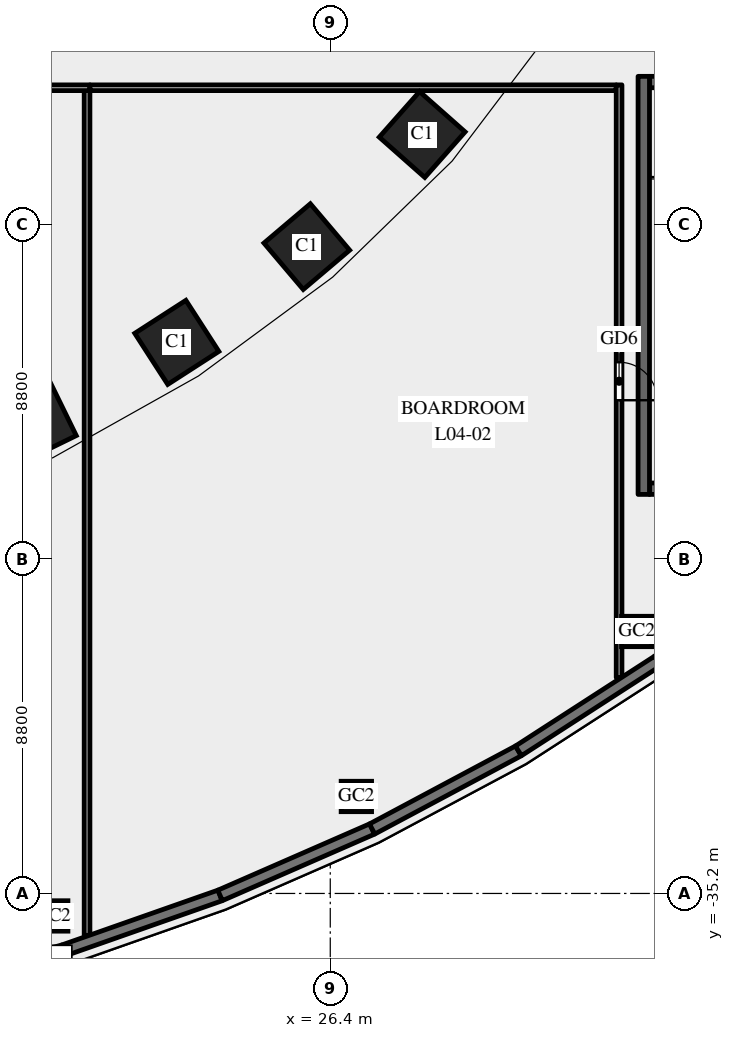
"""IFC4 building model, lengths in metres.
Left out: names, types, materials, properties, quantities, classifications, styles, units other than length and angle.
Written with IfcOpenShell. Run it as: python <this file> out.ifc"""

import sys

from ifc_helpers import new_model, si_unit, direction, frame, frame_2d, origin, origin_2d, place, context, subcontext, project, spatial, rectangle, hollow_rectangle, extrude, element, fill, save


model = new_model("IFC4")
c1 = context("Model", 3, precision=1e-05, world=origin(), true_north=direction((0.0, 1.0)))
c2 = subcontext(c1, "Body", "Model", "MODEL_VIEW")
j1 = project(units=[si_unit("LENGTHUNIT", "METRE"), si_unit("PLANEANGLEUNIT", "RADIAN")], contexts=[c1])
p1 = place(None, origin())
s1 = spatial("IfcSite", under=j1, at=p1, CompositionType="ELEMENT")
p2 = place(p1, origin())
s2 = spatial("IfcBuilding", under=s1, at=p2, CompositionType="ELEMENT")
p3 = place(p2, frame((0.0, 0.0, 25.0)))
s3 = spatial("IfcBuildingStorey", under=s2, at=p3, CompositionType="ELEMENT", Elevation=25.0)
for number, where, z_axis, x_axis in (
    (1, (18.646, -22.785, 0.0), (0.0, 0.0, 1.0), (0.898, 0.439, 0.0)),
    (2, (22.362, -20.7, 0.0), (0.0, 0.0, 1.0), (0.84, 0.542, 0.0)),
    (3, (25.783, -18.18, 0.0), (0.0, 0.0, 1.0), (0.763, 0.646, 0.0)),
    (4, (28.819, -15.23, 0.0), (0.0, 0.0, 1.0), (0.663, 0.749, 0.0)),
):
    element("IfcColumn", number, at=place(p3, frame(where, z_axis=z_axis, x_axis=x_axis)), inside=s3, PredefinedType="COLUMN", context=c2, shape_type="SweptSolid", body=[
        extrude(rectangle(XDim=1.6, YDim=1.6, at=origin_2d()), origin(), (0.0, 0.0, 1.0), 5.5),
    ])
for number, where, z_axis, x_axis in (
    (5, (19.097, -35.792, 0.0), (0.0, 0.0, 1.0), (1.0, 0.0, 0.0)),
    (6, (27.087, -32.648, 0.0), (0.0, 0.0, 1.0), (1.0, 0.0, 0.0)),
    (7, (34.465, -28.307, 0.0), (0.0, 0.0, 1.0), (1.0, 0.0, 0.0)),
):
    element("IfcColumn", number, at=place(p3, frame(where, z_axis=z_axis, x_axis=x_axis)), inside=s3, PredefinedType="COLUMN", context=c2, shape_type="SweptSolid", body=[
        extrude(hollow_rectangle(XDim=0.8, YDim=0.8, WallThickness=0.04, at=origin_2d()), origin(), (0.0, 0.0, 1.0), 5.488),
    ])
p4 = place(p3, frame((20.0, -14.075, 0.0), z_axis=(0.0, 0.0, 1.0), x_axis=(0.0, -1.0, 0.0)))
e8 = element("IfcWall", 8, at=p4, inside=s3, PredefinedType="PARTITIONING", context=c2, shape_type="SweptSolid", body=[
    extrude(rectangle(XDim=22.228, YDim=0.15, at=frame_2d((11.114, 0.0))), origin(), (0.0, 0.0, 1.0), 4.2),
])
p5 = place(p3, frame((-20.075, -14.0, 0.0), z_axis=(0.0, 0.0, 1.0), x_axis=(1.0, 0.0, 0.0)))
e9 = element("IfcWall", 9, at=p5, inside=s3, PredefinedType="PARTITIONING", context=c2, shape_type="SweptSolid", body=[
    extrude(rectangle(XDim=40.15, YDim=0.15, at=frame_2d((20.075, 0.0))), origin(), (0.0, 0.0, 1.0), 4.15),
])
p6 = place(p5, frame((19.375, 0.0, 0.0)))
e10 = element("IfcOpeningElement", 10, at=p6, cuts=e9, PredefinedType="OPENING", context=c2, shape_type="SweptSolid", body=[
    extrude(rectangle(XDim=1.4, YDim=2.1, at=frame_2d((0.7, 1.05))), frame((0.0, 0.085, 0.0), z_axis=(0.0, -1.0, 0.0), x_axis=(1.0, 0.0, 0.0)), (0.0, 0.0, 1.0), 0.17),
])
p7 = place(p3, frame((20.075, -14.0, 0.0), z_axis=(0.0, 0.0, 1.0), x_axis=(1.0, 0.0, 0.0)))
e11 = element("IfcWall", 11, at=p7, inside=s3, PredefinedType="PARTITIONING", context=c2, shape_type="SweptSolid", body=[
    extrude(rectangle(XDim=13.85, YDim=0.15, at=frame_2d((6.925, 0.0))), origin(), (0.0, 0.0, 1.0), 4.15),
])
p8 = place(p3, frame((34.0, -13.925, 0.0), z_axis=(0.0, 0.0, 1.0), x_axis=(0.0, -1.0, 0.0)))
e12 = element("IfcWall", 12, at=p8, inside=s3, PredefinedType="PARTITIONING", context=c2, shape_type="SweptSolid", body=[
    extrude(rectangle(XDim=15.594, YDim=0.15, at=frame_2d((7.797, 0.0))), origin(), (0.0, 0.0, 1.0), 4.2),
])
p9 = place(p8, frame((7.297, 0.0, 0.0)))
e13 = element("IfcOpeningElement", 13, at=p9, cuts=e12, PredefinedType="OPENING", context=c2, shape_type="SweptSolid", body=[
    extrude(rectangle(XDim=1.0, YDim=2.1, at=frame_2d((0.5, 1.05))), frame((0.0, 0.085, 0.0), z_axis=(0.0, -1.0, 0.0), x_axis=(1.0, 0.0, 0.0)), (0.0, 0.0, 1.0), 0.17),
])
p10 = place(p3, frame((15.165, -37.85, 0.0), z_axis=(0.0, 0.0, 1.0), x_axis=(0.964679950239, 0.263424739931, 0.0)))
e14 = element("IfcWall", 14, at=p10, inside=s3, PredefinedType="SOLIDWALL", context=c2, shape_type="SweptSolid", body=[
    extrude(rectangle(XDim=4.369, YDim=0.3, at=frame_2d((2.185, 0.0))), origin(), (0.0, 0.0, 1.0), 5.2),
])
p11 = place(p10, frame((0.985, 0.0, 1.0)))
e15 = element("IfcOpeningElement", 15, at=p11, cuts=e14, PredefinedType="OPENING", context=c2, shape_type="SweptSolid", body=[
    extrude(rectangle(XDim=2.4, YDim=3.0, at=frame_2d((1.2, 1.5))), frame((0.0, 0.16, 0.0), z_axis=(0.0, -1.0, 0.0), x_axis=(1.0, 0.0, 0.0)), (0.0, 0.0, 1.0), 0.32),
])
p12 = place(p3, frame((19.379, -36.699, 0.0), z_axis=(0.0, 0.0, 1.0), x_axis=(0.943526738033, 0.331296384853, 0.0)))
e16 = element("IfcWall", 16, at=p12, inside=s3, PredefinedType="SOLIDWALL", context=c2, shape_type="SweptSolid", body=[
    extrude(rectangle(XDim=4.368, YDim=0.3, at=frame_2d((2.184, 0.0))), origin(), (0.0, 0.0, 1.0), 5.2),
])
p13 = place(p12, frame((0.984, 0.0, 1.0)))
e17 = element("IfcOpeningElement", 17, at=p13, cuts=e16, PredefinedType="OPENING", context=c2, shape_type="SweptSolid", body=[
    extrude(rectangle(XDim=2.4, YDim=3.0, at=frame_2d((1.2, 1.5))), frame((0.0, 0.16, 0.0), z_axis=(0.0, -1.0, 0.0), x_axis=(1.0, 0.0, 0.0)), (0.0, 0.0, 1.0), 0.32),
])
p14 = place(p3, frame((23.5, -35.252, 0.0), z_axis=(0.0, 0.0, 1.0), x_axis=(0.916336904548, 0.400408138483, 0.0)))
e18 = element("IfcWall", 18, at=p14, inside=s3, PredefinedType="SOLIDWALL", context=c2, shape_type="SweptSolid", body=[
    extrude(rectangle(XDim=4.366, YDim=0.3, at=frame_2d((2.183, 0.0))), origin(), (0.0, 0.0, 1.0), 5.2),
])
p15 = place(p14, frame((0.983, 0.0, 1.0)))
e19 = element("IfcOpeningElement", 19, at=p15, cuts=e18, PredefinedType="OPENING", context=c2, shape_type="SweptSolid", body=[
    extrude(rectangle(XDim=2.4, YDim=3.0, at=frame_2d((1.2, 1.5))), frame((0.0, 0.16, 0.0), z_axis=(0.0, -1.0, 0.0), x_axis=(1.0, 0.0, 0.0)), (0.0, 0.0, 1.0), 0.32),
])
p16 = place(p3, frame((27.501, -33.504, 0.0), z_axis=(0.0, 0.0, 1.0), x_axis=(0.882159305704, 0.47095112205, 0.0)))
e20 = element("IfcWall", 20, at=p16, inside=s3, PredefinedType="SOLIDWALL", context=c2, shape_type="SweptSolid", body=[
    extrude(rectangle(XDim=4.365, YDim=0.3, at=frame_2d((2.182, 0.0))), origin(), (0.0, 0.0, 1.0), 5.2),
])
p17 = place(p16, frame((0.982, 0.0, 1.0)))
e21 = element("IfcOpeningElement", 21, at=p17, cuts=e20, PredefinedType="OPENING", context=c2, shape_type="SweptSolid", body=[
    extrude(rectangle(XDim=2.4, YDim=3.0, at=frame_2d((1.2, 1.5))), frame((0.0, 0.16, 0.0), z_axis=(0.0, -1.0, 0.0), x_axis=(1.0, 0.0, 0.0)), (0.0, 0.0, 1.0), 0.32),
])
p18 = place(p3, frame((31.352, -31.448, 0.0), z_axis=(0.0, 0.0, 1.0), x_axis=(0.840047348843, 0.542513088969, 0.0)))
e22 = element("IfcWall", 22, at=p18, inside=s3, PredefinedType="SOLIDWALL", context=c2, shape_type="SweptSolid", body=[
    extrude(rectangle(XDim=4.362, YDim=0.3, at=frame_2d((2.181, 0.0))), origin(), (0.0, 0.0, 1.0), 5.2),
])
p19 = place(p18, frame((0.691, 0.0, 1.0)))
e23 = element("IfcOpeningElement", 23, at=p19, cuts=e22, PredefinedType="OPENING", context=c2, shape_type="SweptSolid", body=[
    extrude(rectangle(XDim=2.4, YDim=3.0, at=frame_2d((1.2, 1.5))), frame((0.0, 0.16, 0.0), z_axis=(0.0, -1.0, 0.0), x_axis=(1.0, 0.0, 0.0)), (0.0, 0.0, 1.0), 0.32),
])
p20 = place(p3, frame((35.016, -29.082, 0.0), z_axis=(0.0, 0.0, 1.0), x_axis=(0.788491985196, 0.615045030288, 0.0)))
e24 = element("IfcWall", 24, at=p20, inside=s3, PredefinedType="SOLIDWALL", context=c2, shape_type="SweptSolid", body=[
    extrude(rectangle(XDim=4.359, YDim=0.3, at=frame_2d((2.18, 0.0))), origin(), (0.0, 0.0, 1.0), 5.2),
])
p21 = place(p20, frame((0.98, 0.0, 1.0)))
e25 = element("IfcOpeningElement", 25, at=p21, cuts=e24, PredefinedType="OPENING", context=c2, shape_type="SweptSolid", body=[
    extrude(rectangle(XDim=2.4, YDim=3.0, at=frame_2d((1.2, 1.5))), frame((0.0, 0.16, 0.0), z_axis=(0.0, -1.0, 0.0), x_axis=(1.0, 0.0, 0.0)), (0.0, 0.0, 1.0), 0.32),
])
p22 = place(p3, frame((34.65, -24.7, 0.0), z_axis=(0.0, 0.0, 1.0), x_axis=(0.0, 1.0, 0.0)))
e26 = element("IfcWall", 26, at=p22, inside=s3, PredefinedType="SHEAR", context=c2, shape_type="SweptSolid", body=[
    extrude(rectangle(XDim=11.0, YDim=0.3, at=frame_2d((5.5, 0.0))), origin(), (0.0, 0.0, 1.0), 5.2),
])
p23 = place(p3, frame((34.8, -24.55, 0.0), z_axis=(0.0, 0.0, 1.0), x_axis=(1.0, 0.0, 0.0)))
e27 = element("IfcWall", 27, at=p23, inside=s3, PredefinedType="SHEAR", context=c2, shape_type="SweptSolid", body=[
    extrude(rectangle(XDim=4.95, YDim=0.3, at=frame_2d((2.475, 0.0))), origin(), (0.0, 0.0, 1.0), 5.2),
])
p24 = place(p3, frame((34.8, -13.85, 0.0), z_axis=(0.0, 0.0, 1.0), x_axis=(1.0, 0.0, 0.0)))
e28 = element("IfcWall", 28, at=p24, inside=s3, PredefinedType="SHEAR", context=c2, shape_type="SweptSolid", body=[
    extrude(rectangle(XDim=4.95, YDim=0.3, at=frame_2d((2.475, 0.0))), origin(), (0.0, 0.0, 1.0), 5.2),
])
p25 = place(p24, frame((1.475, 0.0, 0.0)))
e29 = element("IfcOpeningElement", 29, at=p25, cuts=e28, PredefinedType="OPENING", context=c2, shape_type="SweptSolid", body=[
    extrude(rectangle(XDim=2.0, YDim=2.1, at=frame_2d((1.0, 1.05))), frame((0.0, 0.16, 0.0), z_axis=(0.0, -1.0, 0.0), x_axis=(1.0, 0.0, 0.0)), (0.0, 0.0, 1.0), 0.32),
])
p26 = place(p9, origin())
e30 = element("IfcDoor", 30, at=p26, inside=s3, OperationType="SINGLE_SWING_RIGHT", PredefinedType="DOOR", context=c2, shape_type="SweptSolid", body=[
    extrude(rectangle(XDim=1.0, YDim=2.1, at=frame_2d((0.5, 1.05))), frame((0.0, 0.025, 0.0), z_axis=(0.0, -1.0, 0.0), x_axis=(1.0, 0.0, 0.0)), (0.0, 0.0, 1.0), 0.05),
])
fill(e13, e30)
p27 = place(p13, origin())
e31 = element("IfcWindow", 31, at=p27, inside=s3, PartitioningType="SINGLE_PANEL", PredefinedType="WINDOW", context=c2, shape_type="SweptSolid", body=[
    extrude(rectangle(XDim=2.4, YDim=3.0, at=frame_2d((1.2, 1.5))), frame((0.0, 0.03, 0.0), z_axis=(0.0, -1.0, 0.0), x_axis=(1.0, 0.0, 0.0)), (0.0, 0.0, 1.0), 0.06),
])
fill(e17, e31)
p28 = place(p15, origin())
e32 = element("IfcWindow", 32, at=p28, inside=s3, PartitioningType="SINGLE_PANEL", PredefinedType="WINDOW", context=c2, shape_type="SweptSolid", body=[
    extrude(rectangle(XDim=2.4, YDim=3.0, at=frame_2d((1.2, 1.5))), frame((0.0, 0.03, 0.0), z_axis=(0.0, -1.0, 0.0), x_axis=(1.0, 0.0, 0.0)), (0.0, 0.0, 1.0), 0.06),
])
fill(e19, e32)
p29 = place(p17, origin())
e33 = element("IfcWindow", 33, at=p29, inside=s3, PartitioningType="SINGLE_PANEL", PredefinedType="WINDOW", context=c2, shape_type="SweptSolid", body=[
    extrude(rectangle(XDim=2.4, YDim=3.0, at=frame_2d((1.2, 1.5))), frame((0.0, 0.03, 0.0), z_axis=(0.0, -1.0, 0.0), x_axis=(1.0, 0.0, 0.0)), (0.0, 0.0, 1.0), 0.06),
])
fill(e21, e33)
p30 = place(p19, origin())
e34 = element("IfcWindow", 34, at=p30, inside=s3, PartitioningType="SINGLE_PANEL", PredefinedType="WINDOW", context=c2, shape_type="SweptSolid", body=[
    extrude(rectangle(XDim=2.4, YDim=3.0, at=frame_2d((1.2, 1.5))), frame((0.0, 0.03, 0.0), z_axis=(0.0, -1.0, 0.0), x_axis=(1.0, 0.0, 0.0)), (0.0, 0.0, 1.0), 0.06),
])
fill(e23, e34)
save(model, sys.argv[1])
